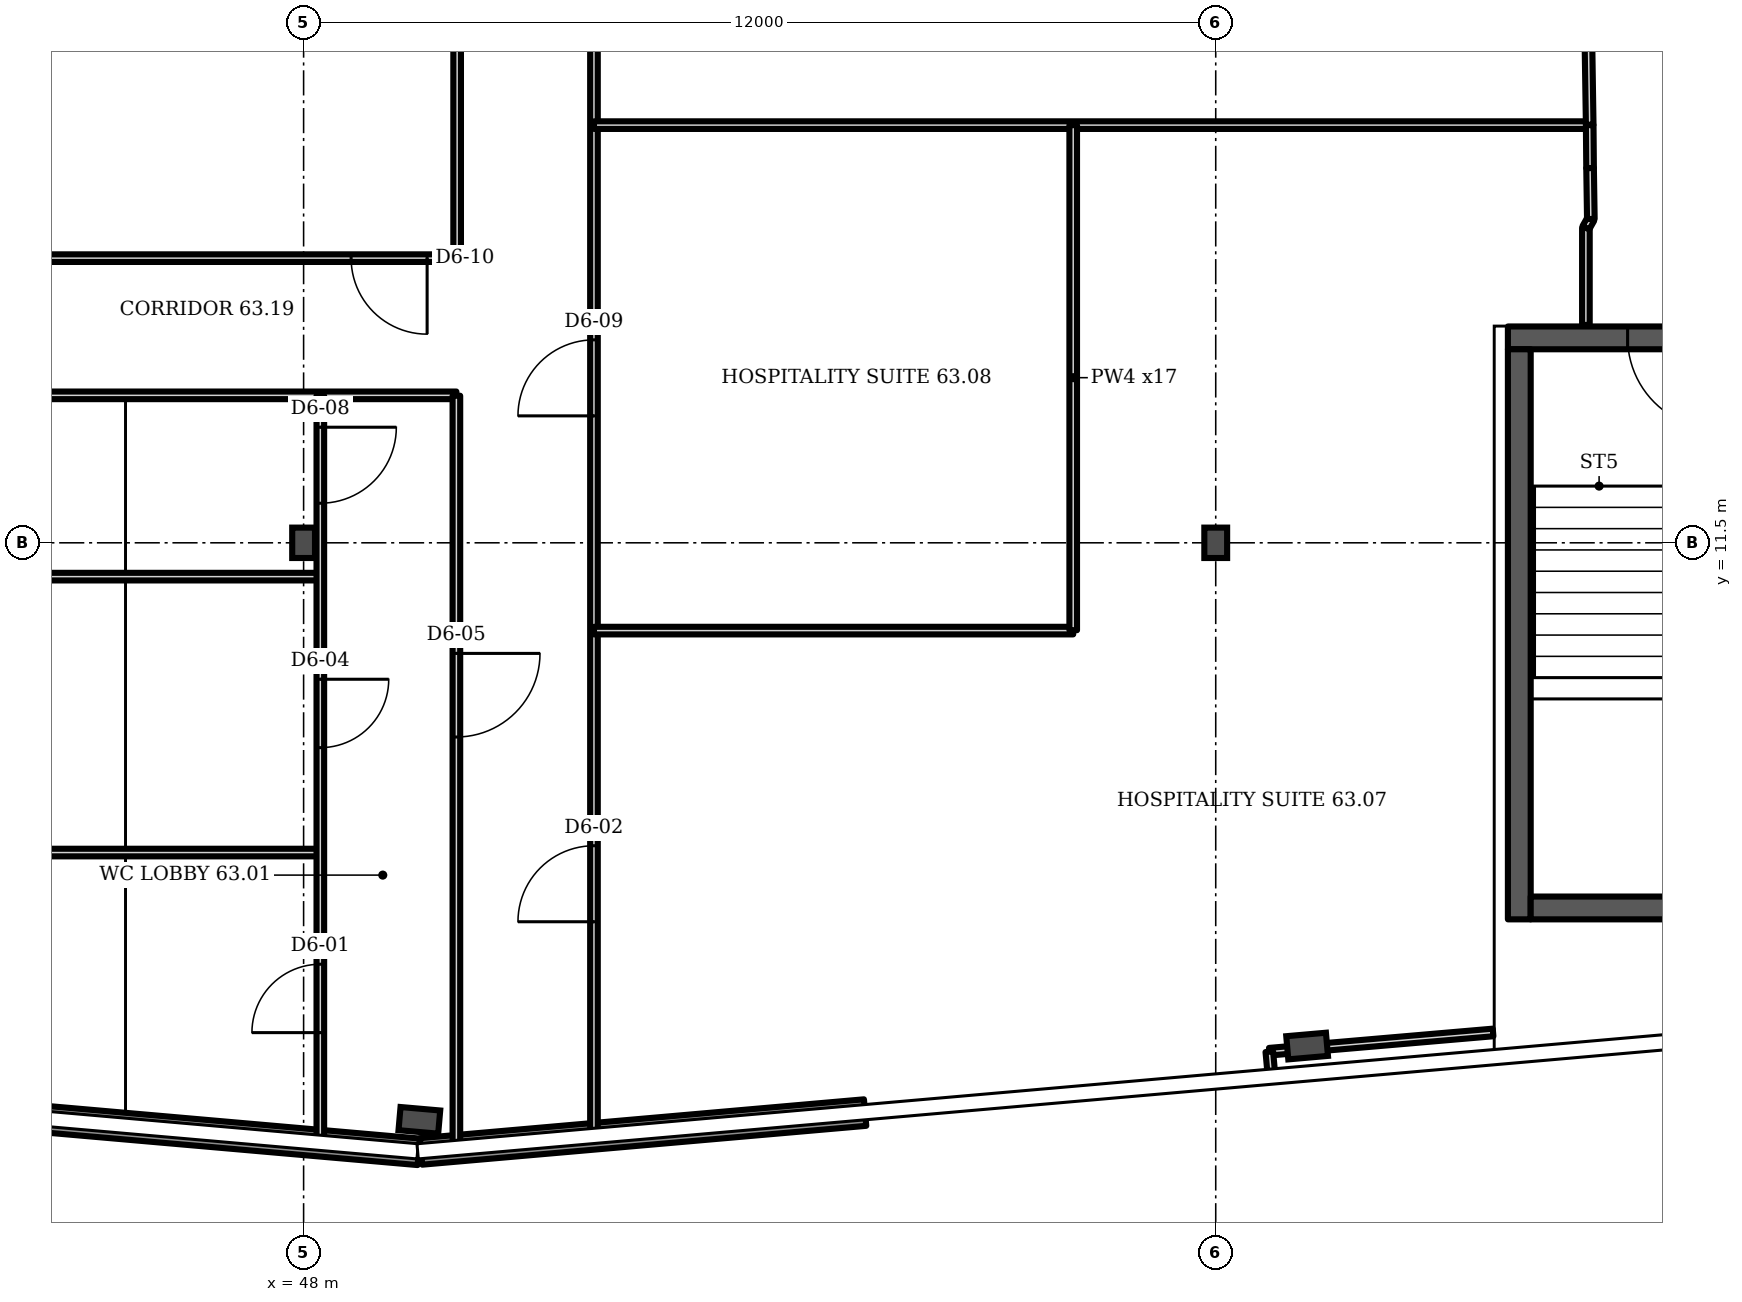
"""IFC4 building model, lengths in metres.
Left out: names, types, materials, properties, quantities, classifications, styles, units other than length and angle.
Written with IfcOpenShell. Run it as: python <this file> out.ifc"""

import sys

from ifc_helpers import new_model, si_unit, direction, frame, frame_2d, origin, origin_2d, place, context, subcontext, project, spatial, rectangle, i_section, extrude, element, fill, save


model = new_model("IFC4")
c1 = context("Model", 3, precision=1e-05, world=origin(), true_north=direction((0.0, 1.0)))
c2 = subcontext(c1, "Body", "Model", "MODEL_VIEW")
j1 = project(units=[si_unit("LENGTHUNIT", "METRE"), si_unit("PLANEANGLEUNIT", "RADIAN")], contexts=[c1])
p1 = place(None, origin())
s1 = spatial("IfcSite", under=j1, at=p1, CompositionType="ELEMENT")
p2 = place(p1, origin())
s2 = spatial("IfcBuilding", under=s1, at=p2, CompositionType="ELEMENT")
p3 = place(p2, frame((0.0, 0.0, 250.3)))
s3 = spatial("IfcBuildingStorey", under=s2, at=p3, CompositionType="ELEMENT", Elevation=250.3)
for number, where, z_axis, x_axis in (
    (1, (49.523, 3.902, 0.0), (0.0, 0.0, 1.0), (-0.087, -0.996, 0.0)),
    (2, (61.202, 4.879, 0.0), (0.0, 0.0, 1.0), (0.087, -0.996, 0.0)),
):
    element("IfcColumn", number, at=place(p3, frame(where, z_axis=z_axis, x_axis=x_axis)), inside=s3, PredefinedType="COLUMN", context=c2, shape_type="SweptSolid", body=[
        extrude(i_section(OverallWidth=0.306, OverallDepth=0.524, WebThickness=0.021, FlangeThickness=0.04, FilletRadius=0.027, at=origin_2d()), origin(), (0.0, 0.0, 1.0), 3.6),
    ])
for number, where, z_axis, x_axis in (
    (3, (48.0, 11.5, 0.0), (0.0, 0.0, 1.0), (1.0, 0.0, 0.0)),
    (4, (60.0, 11.5, 0.0), (0.0, 0.0, 1.0), (1.0, 0.0, 0.0)),
):
    element("IfcColumn", number, at=place(p3, frame(where, z_axis=z_axis, x_axis=x_axis)), inside=s3, PredefinedType="COLUMN", context=c2, shape_type="SweptSolid", body=[
        extrude(i_section(OverallWidth=0.3, OverallDepth=0.4, WebThickness=0.013, FlangeThickness=0.024, FilletRadius=0.027, at=origin_2d()), origin(), (0.0, 0.0, 1.0), 3.6),
    ])
p4 = place(p3, frame((37.729, 4.519, 0.0), z_axis=(0.0, 0.0, 1.0), x_axis=(0.99619, -0.087167, 0.0)))
e5 = element("IfcWall", 5, at=p4, inside=s3, PredefinedType="SOLIDWALL", context=c2, shape_type="SweptSolid", body=[
    extrude(rectangle(XDim=11.831, YDim=0.35, at=frame_2d((5.915, 0.0))), origin(), (0.0, 0.0, 1.0), 1.0),
])
p5 = place(p3, frame((49.545, 3.493, 0.0), z_axis=(0.0, 0.0, 1.0), x_axis=(0.996196, 0.087138, 0.0)))
e6 = element("IfcWall", 6, at=p5, inside=s3, PredefinedType="SOLIDWALL", context=c2, shape_type="SweptSolid", body=[
    extrude(rectangle(XDim=5.864, YDim=0.35, at=frame_2d((2.932, 0.0))), origin(), (0.0, 0.0, 1.0), 1.0),
])
p6 = place(p3, frame((63.844, 14.196, 0.0), z_axis=(0.0, 0.0, 1.0), x_axis=(1.0, 0.0, 0.0)))
e7 = element("IfcWall", 7, at=p6, inside=s3, PredefinedType="SHEAR", context=c2, shape_type="SweptSolid", body=[
    extrude(rectangle(XDim=4.35, YDim=0.3, at=frame_2d((2.175, 0.0))), origin(), (0.0, 0.0, 1.0), 3.2),
])
p7 = place(p6, frame((1.575, 0.0, 0.0)))
e8 = element("IfcOpeningElement", 8, at=p7, cuts=e7, PredefinedType="OPENING", context=c2, shape_type="SweptSolid", body=[
    extrude(rectangle(XDim=1.2, YDim=2.1, at=frame_2d((0.6, 1.05))), frame((0.0, 0.16, 0.0), z_axis=(0.0, -1.0, 0.0), x_axis=(1.0, 0.0, 0.0)), (0.0, 0.0, 1.0), 0.32),
])
p8 = place(p3, frame((40.5, 15.245, 0.0), z_axis=(0.0, 0.0, 1.0), x_axis=(1.0, 0.0, 0.0)))
e9 = element("IfcWall", 9, at=p8, inside=s3, PredefinedType="PARTITIONING", context=c2, shape_type="SweptSolid", body=[
    extrude(rectangle(XDim=9.52, YDim=0.1, at=frame_2d((4.76, 0.0))), origin(), (0.0, 0.0, 1.0), 3.2),
])
p9 = place(p8, frame((8.125, 0.0, 0.0)))
e10 = element("IfcOpeningElement", 10, at=p9, cuts=e9, PredefinedType="OPENING", context=c2, shape_type="SweptSolid", body=[
    extrude(rectangle(XDim=1.0, YDim=2.1, at=frame_2d((0.5, 1.05))), frame((0.0, 0.06, 0.0), z_axis=(0.0, -1.0, 0.0), x_axis=(1.0, 0.0, 0.0)), (0.0, 0.0, 1.0), 0.12),
])
for number, where, z_axis, x_axis in (
    (11, (44.327, 7.425, 0.0), (0.0, 0.0, 1.0), (1.0, 0.0, 0.0)),
    (12, (44.327, 11.055, 0.0), (0.0, 0.0, 1.0), (1.0, 0.0, 0.0)),
):
    element("IfcWall", number, at=place(p3, frame(where, z_axis=z_axis, x_axis=x_axis)), inside=s3, PredefinedType="PARTITIONING", context=c2, shape_type="SweptSolid", body=[
        extrude(rectangle(XDim=3.893, YDim=0.1, at=frame_2d((1.946, 0.0))), origin(), (0.0, 0.0, 1.0), 3.2),
    ])
p10 = place(p3, frame((44.327, 13.44, 0.0), z_axis=(0.0, 0.0, 1.0), x_axis=(1.0, 0.0, 0.0)))
e13 = element("IfcWall", 13, at=p10, inside=s3, PredefinedType="PARTITIONING", context=c2, shape_type="SweptSolid", body=[
    extrude(rectangle(XDim=5.683, YDim=0.1, at=frame_2d((2.841, 0.0))), origin(), (0.0, 0.0, 1.0), 3.2),
])
p11 = place(p3, frame((48.22, 3.626, 0.0), z_axis=(0.0, 0.0, 1.0), x_axis=(0.0, 1.0, 0.0)))
e14 = element("IfcWall", 14, at=p11, inside=s3, PredefinedType="PARTITIONING", context=c2, shape_type="SweptSolid", body=[
    extrude(rectangle(XDim=9.809, YDim=0.1, at=frame_2d((4.904, 0.0))), origin(), (0.0, 0.0, 1.0), 2.58),
])
p12 = place(p11, frame((1.43, 0.0, 0.0)))
e15 = element("IfcOpeningElement", 15, at=p12, cuts=e14, PredefinedType="OPENING", context=c2, shape_type="SweptSolid", body=[
    extrude(rectangle(XDim=0.9, YDim=2.1, at=frame_2d((0.45, 1.05))), frame((0.0, 0.06, 0.0), z_axis=(0.0, -1.0, 0.0), x_axis=(1.0, 0.0, 0.0)), (0.0, 0.0, 1.0), 0.12),
])
p13 = place(p11, frame((5.179, 0.0, 0.0)))
e16 = element("IfcOpeningElement", 16, at=p13, cuts=e14, PredefinedType="OPENING", context=c2, shape_type="SweptSolid", body=[
    extrude(rectangle(XDim=0.9, YDim=2.1, at=frame_2d((0.45, 1.05))), frame((0.0, 0.06, 0.0), z_axis=(0.0, -1.0, 0.0), x_axis=(1.0, 0.0, 0.0)), (0.0, 0.0, 1.0), 0.12),
])
p14 = place(p11, frame((8.395, 0.0, 0.0)))
e17 = element("IfcOpeningElement", 17, at=p14, cuts=e14, PredefinedType="OPENING", context=c2, shape_type="SweptSolid", body=[
    extrude(rectangle(XDim=1.0, YDim=2.1, at=frame_2d((0.5, 1.05))), frame((0.0, 0.06, 0.0), z_axis=(0.0, -1.0, 0.0), x_axis=(1.0, 0.0, 0.0)), (0.0, 0.0, 1.0), 0.12),
])
p15 = place(p3, frame((50.01, 3.559, 0.0), z_axis=(0.0, 0.0, 1.0), x_axis=(0.0, 1.0, 0.0)))
e18 = element("IfcWall", 18, at=p15, inside=s3, PredefinedType="PARTITIONING", context=c2, shape_type="SweptSolid", body=[
    extrude(rectangle(XDim=9.876, YDim=0.1, at=frame_2d((4.938, 0.0))), origin(), (0.0, 0.0, 1.0), 2.58),
])
p16 = place(p15, frame((5.386, 0.0, 0.0)))
e19 = element("IfcOpeningElement", 19, at=p16, cuts=e18, PredefinedType="OPENING", context=c2, shape_type="SweptSolid", body=[
    extrude(rectangle(XDim=1.1, YDim=2.1, at=frame_2d((0.55, 1.05))), frame((0.0, 0.06, 0.0), z_axis=(0.0, -1.0, 0.0), x_axis=(1.0, 0.0, 0.0)), (0.0, 0.0, 1.0), 0.12),
])
p17 = place(p3, frame((50.02, 15.245, 0.0), z_axis=(0.0, 0.0, 1.0), x_axis=(0.0, 1.0, 0.0)))
e20 = element("IfcWall", 20, at=p17, inside=s3, PredefinedType="PARTITIONING", context=c2, shape_type="SweptSolid", body=[
    extrude(rectangle(XDim=15.255, YDim=0.1, at=frame_2d((7.627, 0.0))), origin(), (0.0, 0.0, 1.0), 3.2),
])
p18 = place(p17, frame((13.955, 0.0, 0.0)))
e21 = element("IfcOpeningElement", 21, at=p18, cuts=e20, PredefinedType="OPENING", context=c2, shape_type="SweptSolid", body=[
    extrude(rectangle(XDim=1.0, YDim=2.1, at=frame_2d((0.5, 1.05))), frame((0.0, 0.06, 0.0), z_axis=(0.0, -1.0, 0.0), x_axis=(1.0, 0.0, 0.0)), (0.0, 0.0, 1.0), 0.12),
])
p19 = place(p3, frame((51.82, 3.717, 0.0), z_axis=(0.0, 0.0, 1.0), x_axis=(0.0, 1.0, 0.0)))
e22 = element("IfcWall", 22, at=p19, inside=s3, PredefinedType="PARTITIONING", context=c2, shape_type="SweptSolid", body=[
    extrude(rectangle(XDim=26.783, YDim=0.1, at=frame_2d((13.391, 0.0))), origin(), (0.0, 0.0, 1.0), 2.58),
])
p20 = place(p19, frame((2.798, 0.0, 0.0)))
e23 = element("IfcOpeningElement", 23, at=p20, cuts=e22, PredefinedType="OPENING", context=c2, shape_type="SweptSolid", body=[
    extrude(rectangle(XDim=1.0, YDim=2.1, at=frame_2d((0.5, 1.05))), frame((0.0, 0.06, 0.0), z_axis=(0.0, -1.0, 0.0), x_axis=(1.0, 0.0, 0.0)), (0.0, 0.0, 1.0), 0.12),
])
p21 = place(p19, frame((9.453, 0.0, 0.0)))
e24 = element("IfcOpeningElement", 24, at=p21, cuts=e22, PredefinedType="OPENING", context=c2, shape_type="SweptSolid", body=[
    extrude(rectangle(XDim=1.0, YDim=2.1, at=frame_2d((0.5, 1.05))), frame((0.0, 0.06, 0.0), z_axis=(0.0, -1.0, 0.0), x_axis=(1.0, 0.0, 0.0)), (0.0, 0.0, 1.0), 0.12),
])
p22 = place(p3, frame((51.82, 10.345, 0.0), z_axis=(0.0, 0.0, 1.0), x_axis=(1.0, 0.0, 0.0)))
e25 = element("IfcWall", 25, at=p22, inside=s3, PredefinedType="PARTITIONING", context=c2, shape_type="SweptSolid", body=[
    extrude(rectangle(XDim=6.305, YDim=0.1, at=frame_2d((3.152, 0.0))), origin(), (0.0, 0.0, 1.0), 3.2),
])
p23 = place(p3, frame((51.82, 16.995, 0.0), z_axis=(0.0, 0.0, 1.0), x_axis=(1.0, 0.0, 0.0)))
e26 = element("IfcWall", 26, at=p23, inside=s3, PredefinedType="PARTITIONING", context=c2, shape_type="SweptSolid", body=[
    extrude(rectangle(XDim=13.1, YDim=0.1, at=frame_2d((6.55, 0.0))), origin(), (0.0, 0.0, 1.0), 3.2),
])
p24 = place(p3, frame((58.125, 10.35, 0.0), z_axis=(0.0, 0.0, 1.0), x_axis=(0.0, 1.0, 0.0)))
e27 = element("IfcWall", 27, at=p24, inside=s3, PredefinedType="PARTITIONING", context=c2, shape_type="SweptSolid", body=[
    extrude(rectangle(XDim=6.645, YDim=0.1, at=frame_2d((3.323, 0.0))), origin(), (0.0, 0.0, 1.0), 3.2),
])
p25 = place(p3, frame((60.705, 4.805, 0.0), z_axis=(0.0, 0.0, 1.0), x_axis=(0.996324, 0.085692, 0.0)))
e28 = element("IfcWall", 28, at=p25, inside=s3, PredefinedType="PARTITIONING", context=c2, shape_type="SweptSolid", body=[
    extrude(rectangle(XDim=2.955, YDim=0.1, at=frame_2d((1.477, 0.0))), origin(), (0.0, 0.0, 1.0), 2.58),
])
p26 = place(p3, frame((60.733, 4.497, 0.0), z_axis=(0.0, 0.0, 1.0), x_axis=(-0.090037, 0.995936, 0.0)))
e29 = element("IfcWall", 29, at=p26, inside=s3, PredefinedType="PARTITIONING", context=c2, shape_type="SweptSolid", body=[
    extrude(rectangle(XDim=0.309, YDim=0.1, at=frame_2d((0.155, 0.0))), origin(), (0.0, 0.0, 1.0), 3.2),
])
p27 = place(p3, frame((64.87, 14.366, 0.0), z_axis=(0.0, 0.0, 1.0), x_axis=(0.0, 1.0, 0.0)))
e30 = element("IfcWall", 30, at=p27, inside=s3, PredefinedType="PARTITIONING", context=c2, shape_type="SweptSolid", body=[
    extrude(rectangle(XDim=1.279, YDim=0.1, at=frame_2d((0.639, 0.0))), origin(), (0.0, 0.0, 1.0), 3.2),
])
p28 = place(p3, frame((64.87, 15.645, 0.0), z_axis=(0.0, 0.0, 1.0), x_axis=(0.491751, 0.870732, 0.0)))
e31 = element("IfcWall", 31, at=p28, inside=s3, PredefinedType="PARTITIONING", context=c2, shape_type="SweptSolid", body=[
    extrude(rectangle(XDim=0.132, YDim=0.1, at=frame_2d((0.066, 0.0))), origin(), (0.0, 0.0, 1.0), 3.2),
])
p29 = place(p3, frame((64.92, 17.0, 0.0), z_axis=(0.0, 0.0, 1.0), x_axis=(-0.015303, 0.999879, 0.0)))
e32 = element("IfcWall", 32, at=p29, inside=s3, PredefinedType="PARTITIONING", context=c2, shape_type="SweptSolid", body=[
    extrude(rectangle(XDim=2.935, YDim=0.1, at=frame_2d((1.468, 0.0))), origin(), (0.0, 0.0, 1.0), 3.2),
])
p30 = place(p29, frame((1.564, 0.0, 0.0)))
e33 = element("IfcOpeningElement", 33, at=p30, cuts=e32, PredefinedType="OPENING", context=c2, shape_type="SweptSolid", body=[
    extrude(rectangle(XDim=1.0, YDim=2.1, at=frame_2d((0.5, 1.05))), frame((0.0, 0.06, 0.0), z_axis=(0.0, -1.0, 0.0), x_axis=(1.0, 0.0, 0.0)), (0.0, 0.0, 1.0), 0.12),
])
p31 = place(p3, frame((64.925, 16.43, 0.0), z_axis=(0.0, 0.0, 1.0), x_axis=(-0.009071, 0.999963, 0.0)))
e34 = element("IfcWall", 34, at=p31, inside=s3, PredefinedType="PARTITIONING", context=c2, shape_type="SweptSolid", body=[
    extrude(rectangle(XDim=0.565, YDim=0.1, at=frame_2d((0.283, 0.0))), origin(), (0.0, 0.0, 1.0), 3.2),
])
p32 = place(p3, frame((64.935, 15.76, 0.0), z_axis=(0.0, 0.0, 1.0), x_axis=(-0.01494, 0.999887, 0.0)))
e35 = element("IfcWall", 35, at=p32, inside=s3, PredefinedType="PARTITIONING", context=c2, shape_type="SweptSolid", body=[
    extrude(rectangle(XDim=0.67, YDim=0.1, at=frame_2d((0.335, 0.0))), origin(), (0.0, 0.0, 1.0), 3.2),
])
p33 = place(p3, frame((63.994, 6.546, 0.0), z_axis=(0.0, 0.0, 1.0), x_axis=(0.0, 1.0, 0.0)))
e36 = element("IfcWall", 36, at=p33, inside=s3, PredefinedType="SHEAR", context=c2, shape_type="SweptSolid", body=[
    extrude(rectangle(XDim=7.5, YDim=0.3, at=frame_2d((3.75, 0.0))), origin(), (0.0, 0.0, 1.0), 3.2),
])
p34 = place(p3, frame((64.144, 6.696, 0.0), z_axis=(0.0, 0.0, 1.0), x_axis=(1.0, 0.0, 0.0)))
e37 = element("IfcWall", 37, at=p34, inside=s3, PredefinedType="SHEAR", context=c2, shape_type="SweptSolid", body=[
    extrude(rectangle(XDim=3.75, YDim=0.3, at=frame_2d((1.875, 0.0))), origin(), (0.0, 0.0, 1.0), 3.2),
])
p35 = place(p7, origin())
e38 = element("IfcDoor", 38, at=p35, inside=s3, OperationType="SINGLE_SWING_RIGHT", PredefinedType="DOOR", context=c2, shape_type="SweptSolid", body=[
    extrude(rectangle(XDim=1.2, YDim=2.1, at=frame_2d((0.6, 1.05))), frame((0.0, 0.025, 0.0), z_axis=(0.0, -1.0, 0.0), x_axis=(1.0, 0.0, 0.0)), (0.0, 0.0, 1.0), 0.05),
])
fill(e8, e38)
p36 = place(p12, origin())
e39 = element("IfcDoor", 39, at=p36, inside=s3, OperationType="SINGLE_SWING_LEFT", PredefinedType="DOOR", context=c2, shape_type="SweptSolid", body=[
    extrude(rectangle(XDim=0.9, YDim=2.1, at=frame_2d((0.45, 1.05))), frame((0.0, 0.025, 0.0), z_axis=(0.0, -1.0, 0.0), x_axis=(1.0, 0.0, 0.0)), (0.0, 0.0, 1.0), 0.05),
])
fill(e15, e39)
p37 = place(p20, origin())
e40 = element("IfcDoor", 40, at=p37, inside=s3, OperationType="SINGLE_SWING_LEFT", PredefinedType="DOOR", context=c2, shape_type="SweptSolid", body=[
    extrude(rectangle(XDim=1.0, YDim=2.1, at=frame_2d((0.5, 1.05))), frame((0.0, 0.025, 0.0), z_axis=(0.0, -1.0, 0.0), x_axis=(1.0, 0.0, 0.0)), (0.0, 0.0, 1.0), 0.05),
])
fill(e23, e40)
p38 = place(p13, origin())
e41 = element("IfcDoor", 41, at=p38, inside=s3, OperationType="SINGLE_SWING_RIGHT", PredefinedType="DOOR", context=c2, shape_type="SweptSolid", body=[
    extrude(rectangle(XDim=0.9, YDim=2.1, at=frame_2d((0.45, 1.05))), frame((0.0, 0.025, 0.0), z_axis=(0.0, -1.0, 0.0), x_axis=(1.0, 0.0, 0.0)), (0.0, 0.0, 1.0), 0.05),
])
fill(e16, e41)
p39 = place(p16, origin())
e42 = element("IfcDoor", 42, at=p39, inside=s3, OperationType="SINGLE_SWING_RIGHT", PredefinedType="DOOR", context=c2, shape_type="SweptSolid", body=[
    extrude(rectangle(XDim=1.1, YDim=2.1, at=frame_2d((0.55, 1.05))), frame((0.0, 0.025, 0.0), z_axis=(0.0, -1.0, 0.0), x_axis=(1.0, 0.0, 0.0)), (0.0, 0.0, 1.0), 0.05),
])
fill(e19, e42)
p40 = place(p14, origin())
e43 = element("IfcDoor", 43, at=p40, inside=s3, OperationType="SINGLE_SWING_RIGHT", PredefinedType="DOOR", context=c2, shape_type="SweptSolid", body=[
    extrude(rectangle(XDim=1.0, YDim=2.1, at=frame_2d((0.5, 1.05))), frame((0.0, 0.025, 0.0), z_axis=(0.0, -1.0, 0.0), x_axis=(1.0, 0.0, 0.0)), (0.0, 0.0, 1.0), 0.05),
])
fill(e17, e43)
p41 = place(p21, origin())
e44 = element("IfcDoor", 44, at=p41, inside=s3, OperationType="SINGLE_SWING_LEFT", PredefinedType="DOOR", context=c2, shape_type="SweptSolid", body=[
    extrude(rectangle(XDim=1.0, YDim=2.1, at=frame_2d((0.5, 1.05))), frame((0.0, 0.025, 0.0), z_axis=(0.0, -1.0, 0.0), x_axis=(1.0, 0.0, 0.0)), (0.0, 0.0, 1.0), 0.05),
])
fill(e24, e44)
p42 = place(p9, origin())
e45 = element("IfcDoor", 45, at=p42, inside=s3, OperationType="SINGLE_SWING_RIGHT", PredefinedType="DOOR", context=c2, shape_type="SweptSolid", body=[
    extrude(rectangle(XDim=1.0, YDim=2.1, at=frame_2d((0.5, 1.05))), frame((0.0, 0.025, 0.0), z_axis=(0.0, -1.0, 0.0), x_axis=(1.0, 0.0, 0.0)), (0.0, 0.0, 1.0), 0.05),
])
fill(e10, e45)
save(model, sys.argv[1])
